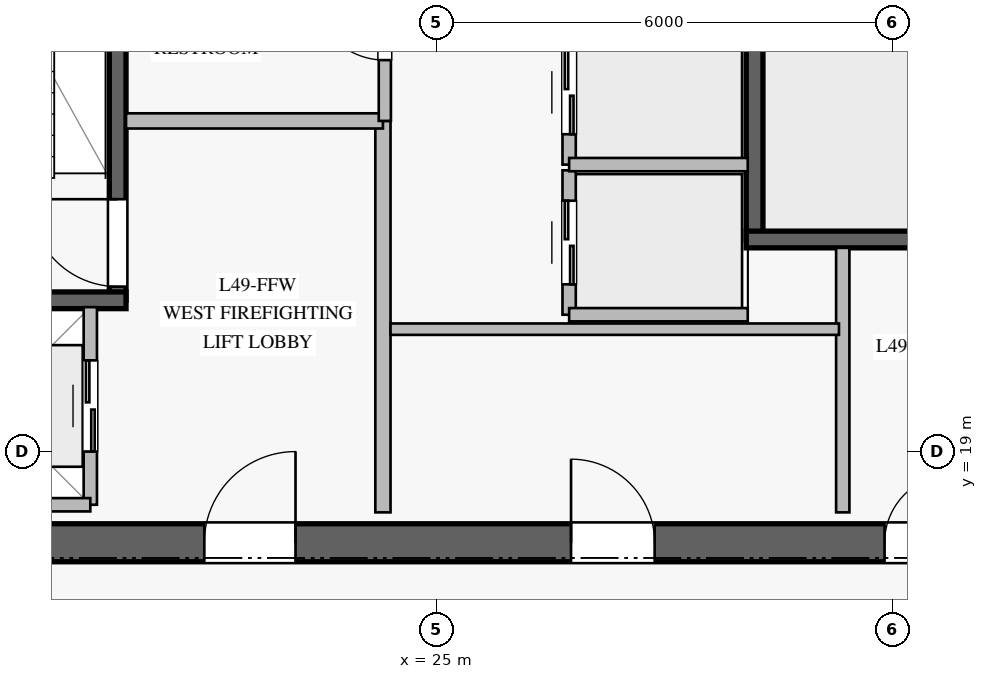
"""IFC4 building model, lengths in metres.
Left out: names, types, materials, properties, quantities, classifications, styles, units other than length and angle.
Written with IfcOpenShell. Run it as: python <this file> out.ifc"""

import sys

from ifc_helpers import new_model, si_unit, direction, frame, frame_2d, origin, place, context, subcontext, project, spatial, rectangle, extrude, element, fill, save


model = new_model("IFC4")
c1 = context("Model", 3, precision=1e-05, world=origin(), true_north=direction((0.0, 1.0)))
c2 = subcontext(c1, "Body", "Model", "MODEL_VIEW")
j1 = project(units=[si_unit("LENGTHUNIT", "METRE"), si_unit("PLANEANGLEUNIT", "RADIAN")], contexts=[c1])
p1 = place(None, origin())
s1 = spatial("IfcSite", under=j1, at=p1, CompositionType="ELEMENT")
p2 = place(p1, origin())
s2 = spatial("IfcBuilding", under=s1, at=p2, CompositionType="ELEMENT")
p3 = place(p2, frame((0.0, 0.0, 204.8)))
s3 = spatial("IfcBuildingStorey", under=s2, at=p3, CompositionType="ELEMENT", Elevation=204.8)
p4 = place(p3, frame((16.95, 17.8, 0.0), z_axis=(0.0, 0.0, 1.0), x_axis=(1.0, 0.0, 0.0)))
e1 = element("IfcWall", 1, at=p4, inside=s3, PredefinedType="SHEAR", context=c2, shape_type="SweptSolid", body=[
    extrude(rectangle(XDim=16.1, YDim=0.5, at=frame_2d((8.05, 0.0))), origin(), (0.0, 0.0, 1.0), 3.78),
])
p5 = place(p4, frame((5.0, 0.0, 0.0)))
e2 = element("IfcOpeningElement", 2, at=p5, cuts=e1, PredefinedType="OPENING", context=c2, shape_type="SweptSolid", body=[
    extrude(rectangle(XDim=1.2, YDim=2.25, at=frame_2d((0.6, 1.125))), frame((0.0, 0.26, 0.0), z_axis=(0.0, -1.0, 0.0), x_axis=(1.0, 0.0, 0.0)), (0.0, 0.0, 1.0), 0.52),
])
p6 = place(p4, frame((13.95, 0.0, 0.0)))
e3 = element("IfcOpeningElement", 3, at=p6, cuts=e1, PredefinedType="OPENING", context=c2, shape_type="SweptSolid", body=[
    extrude(rectangle(XDim=0.9, YDim=2.1, at=frame_2d((0.45, 1.05))), frame((0.0, 0.26, 0.0), z_axis=(0.0, -1.0, 0.0), x_axis=(1.0, 0.0, 0.0)), (0.0, 0.0, 1.0), 0.52),
])
p7 = place(p4, frame((9.825, 0.0, 0.0)))
e4 = element("IfcOpeningElement", 4, at=p7, cuts=e1, PredefinedType="OPENING", context=c2, shape_type="SweptSolid", body=[
    extrude(rectangle(XDim=1.1, YDim=2.2, at=frame_2d((0.55, 1.1))), frame((0.0, 0.26, 0.0), z_axis=(0.0, -1.0, 0.0), x_axis=(1.0, 0.0, 0.0)), (0.0, 0.0, 1.0), 0.52),
])
p8 = place(p3, frame((20.81, 20.99, 0.0), z_axis=(0.0, 0.0, 1.0), x_axis=(0.0, 1.0, 0.0)))
e5 = element("IfcWall", 5, at=p8, inside=s3, PredefinedType="SOLIDWALL", context=c2, shape_type="SweptSolid", body=[
    extrude(rectangle(XDim=7.22, YDim=0.22, at=frame_2d((3.61, 0.0))), origin(), (0.0, 0.0, 1.0), 3.78),
])
p9 = place(p8, frame((0.18, 0.0, 0.0)))
e6 = element("IfcOpeningElement", 6, at=p9, cuts=e5, PredefinedType="OPENING", context=c2, shape_type="SweptSolid", body=[
    extrude(rectangle(XDim=1.15, YDim=2.2, at=frame_2d((0.575, 1.1))), frame((0.0, 0.12, 0.0), z_axis=(0.0, -1.0, 0.0), x_axis=(1.0, 0.0, 0.0)), (0.0, 0.0, 1.0), 0.24),
])
p10 = place(p3, frame((17.2, 20.99, 0.0), z_axis=(0.0, 0.0, 1.0), x_axis=(1.0, 0.0, 0.0)))
e7 = element("IfcWall", 7, at=p10, inside=s3, PredefinedType="SOLIDWALL", context=c2, shape_type="SweptSolid", body=[
    extrude(rectangle(XDim=3.72, YDim=0.22, at=frame_2d((1.86, 0.0))), origin(), (0.0, 0.0, 1.0), 3.78),
])
p11 = place(p3, frame((29.19, 21.79, 0.0), z_axis=(0.0, 0.0, 1.0), x_axis=(0.0, 1.0, 0.0)))
e8 = element("IfcWall", 8, at=p11, inside=s3, PredefinedType="SOLIDWALL", context=c2, shape_type="SweptSolid", body=[
    extrude(rectangle(XDim=7.22, YDim=0.22, at=frame_2d((3.61, 0.0))), origin(), (0.0, 0.0, 1.0), 3.78),
])
p12 = place(p11, frame((5.88, 0.0, 0.0)))
e9 = element("IfcOpeningElement", 9, at=p12, cuts=e8, PredefinedType="OPENING", context=c2, shape_type="SweptSolid", body=[
    extrude(rectangle(XDim=1.15, YDim=2.2, at=frame_2d((0.575, 1.1))), frame((0.0, 0.12, 0.0), z_axis=(0.0, -1.0, 0.0), x_axis=(1.0, 0.0, 0.0)), (0.0, 0.0, 1.0), 0.24),
])
p13 = place(p3, frame((29.08, 21.79, 0.0), z_axis=(0.0, 0.0, 1.0), x_axis=(1.0, 0.0, 0.0)))
e10 = element("IfcWall", 10, at=p13, inside=s3, PredefinedType="SOLIDWALL", context=c2, shape_type="SweptSolid", body=[
    extrude(rectangle(XDim=3.72, YDim=0.22, at=frame_2d((1.86, 0.0))), origin(), (0.0, 0.0, 1.0), 3.78),
])
p14 = place(p3, frame((24.3, 18.2, 0.0), z_axis=(0.0, 0.0, 1.0), x_axis=(0.0, 1.0, 0.0)))
e11 = element("IfcWall", 11, at=p14, inside=s3, PredefinedType="PARTITIONING", context=c2, shape_type="SweptSolid", body=[
    extrude(rectangle(XDim=5.15, YDim=0.2, at=frame_2d((2.575, 0.0))), origin(), (0.0, 0.0, 1.0), 3.78),
])
p15 = place(p3, frame((20.92, 23.35, 0.0), z_axis=(0.0, 0.0, 1.0), x_axis=(1.0, 0.0, 0.0)))
e12 = element("IfcWall", 12, at=p15, inside=s3, PredefinedType="PARTITIONING", context=c2, shape_type="SweptSolid", body=[
    extrude(rectangle(XDim=3.38, YDim=0.2, at=frame_2d((1.69, 0.0))), origin(), (0.0, 0.0, 1.0), 3.78),
])
p16 = place(p3, frame((24.325, 23.35, 0.0), z_axis=(0.0, 0.0, 1.0), x_axis=(0.0, 1.0, 0.0)))
e13 = element("IfcWall", 13, at=p16, inside=s3, PredefinedType="PLUMBINGWALL", context=c2, shape_type="SweptSolid", body=[
    extrude(rectangle(XDim=4.93, YDim=0.16, at=frame_2d((2.465, 0.0))), origin(), (0.0, 0.0, 1.0), 3.78),
])
p17 = place(p16, frame((0.8, 0.0, 0.0)))
e14 = element("IfcOpeningElement", 14, at=p17, cuts=e13, PredefinedType="OPENING", context=c2, shape_type="SweptSolid", body=[
    extrude(rectangle(XDim=0.95, YDim=2.1, at=frame_2d((0.475, 1.05))), frame((0.0, 0.09, 0.0), z_axis=(0.0, -1.0, 0.0), x_axis=(1.0, 0.0, 0.0)), (0.0, 0.0, 1.0), 0.18),
])
p18 = place(p16, frame((3.26, 0.0, 0.0)))
e15 = element("IfcOpeningElement", 15, at=p18, cuts=e13, PredefinedType="OPENING", context=c2, shape_type="SweptSolid", body=[
    extrude(rectangle(XDim=0.9, YDim=2.1, at=frame_2d((0.45, 1.05))), frame((0.0, 0.09, 0.0), z_axis=(0.0, -1.0, 0.0), x_axis=(1.0, 0.0, 0.0)), (0.0, 0.0, 1.0), 0.18),
])
p19 = place(p3, frame((30.35, 18.2, 0.0), z_axis=(0.0, 0.0, 1.0), x_axis=(0.0, 1.0, 0.0)))
e16 = element("IfcWall", 16, at=p19, inside=s3, PredefinedType="PARTITIONING", context=c2, shape_type="SweptSolid", body=[
    extrude(rectangle(XDim=3.48, YDim=0.175, at=frame_2d((1.74, 0.0))), origin(), (0.0, 0.0, 1.0), 3.78),
])
p20 = place(p3, frame((24.4, 20.61, 0.0), z_axis=(0.0, 0.0, 1.0), x_axis=(1.0, 0.0, 0.0)))
e17 = element("IfcWall", 17, at=p20, inside=s3, PredefinedType="PARTITIONING", context=c2, shape_type="SweptSolid", body=[
    extrude(rectangle(XDim=5.9, YDim=0.15, at=frame_2d((2.95, 0.0))), origin(), (0.0, 0.0, 1.0), 3.78),
])
p21 = place(p3, frame((26.75, 20.8, 0.0), z_axis=(0.0, 0.0, 1.0), x_axis=(0.0, 1.0, 0.0)))
e18 = element("IfcWall", 18, at=p21, inside=s3, PredefinedType="PARTITIONING", context=c2, shape_type="SweptSolid", body=[
    extrude(rectangle(XDim=1.9, YDim=0.175, at=frame_2d((0.95, 0.0))), origin(), (0.0, 0.0, 1.0), 3.78),
])
p22 = place(p21, frame((0.4, 0.0, 0.0)))
e19 = element("IfcOpeningElement", 19, at=p22, cuts=e18, PredefinedType="OPENING", context=c2, shape_type="SweptSolid", body=[
    extrude(rectangle(XDim=1.1, YDim=2.2, at=frame_2d((0.55, 1.1))), frame((0.0, 0.098, 0.0), z_axis=(0.0, -1.0, 0.0), x_axis=(1.0, 0.0, 0.0)), (0.0, 0.0, 1.0), 0.195),
])
p23 = place(p3, frame((26.75, 20.8, 0.0), z_axis=(0.0, 0.0, 1.0), x_axis=(1.0, 0.0, 0.0)))
e20 = element("IfcWall", 20, at=p23, inside=s3, PredefinedType="PARTITIONING", context=c2, shape_type="SweptSolid", body=[
    extrude(rectangle(XDim=2.35, YDim=0.175, at=frame_2d((1.175, 0.0))), origin(), (0.0, 0.0, 1.0), 3.78),
])
p24 = place(p3, frame((26.75, 22.775, 0.0), z_axis=(0.0, 0.0, 1.0), x_axis=(0.0, 1.0, 0.0)))
e21 = element("IfcWall", 21, at=p24, inside=s3, PredefinedType="PARTITIONING", context=c2, shape_type="SweptSolid", body=[
    extrude(rectangle(XDim=1.9, YDim=0.175, at=frame_2d((0.95, 0.0))), origin(), (0.0, 0.0, 1.0), 3.78),
])
p25 = place(p24, frame((0.4, 0.0, 0.0)))
e22 = element("IfcOpeningElement", 22, at=p25, cuts=e21, PredefinedType="OPENING", context=c2, shape_type="SweptSolid", body=[
    extrude(rectangle(XDim=1.1, YDim=2.2, at=frame_2d((0.55, 1.1))), frame((0.0, 0.098, 0.0), z_axis=(0.0, -1.0, 0.0), x_axis=(1.0, 0.0, 0.0)), (0.0, 0.0, 1.0), 0.195),
])
p26 = place(p3, frame((26.75, 22.775, 0.0), z_axis=(0.0, 0.0, 1.0), x_axis=(1.0, 0.0, 0.0)))
e23 = element("IfcWall", 23, at=p26, inside=s3, PredefinedType="PARTITIONING", context=c2, shape_type="SweptSolid", body=[
    extrude(rectangle(XDim=2.35, YDim=0.175, at=frame_2d((1.175, 0.0))), origin(), (0.0, 0.0, 1.0), 3.78),
])
p27 = place(p3, frame((20.45, 18.3, 0.0), z_axis=(0.0, 0.0, 1.0), x_axis=(0.0, 1.0, 0.0)))
e24 = element("IfcWall", 24, at=p27, inside=s3, PredefinedType="PARTITIONING", context=c2, shape_type="SweptSolid", body=[
    extrude(rectangle(XDim=2.6, YDim=0.175, at=frame_2d((1.3, 0.0))), origin(), (0.0, 0.0, 1.0), 3.78),
])
p28 = place(p27, frame((0.7, 0.0, 0.0)))
e25 = element("IfcOpeningElement", 25, at=p28, cuts=e24, PredefinedType="OPENING", context=c2, shape_type="SweptSolid", body=[
    extrude(rectangle(XDim=1.2, YDim=2.2, at=frame_2d((0.6, 1.1))), frame((0.0, 0.098, 0.0), z_axis=(0.0, -1.0, 0.0), x_axis=(1.0, 0.0, 0.0)), (0.0, 0.0, 1.0), 0.195),
])
p29 = place(p3, frame((17.85, 18.3, 0.0), z_axis=(0.0, 0.0, 1.0), x_axis=(1.0, 0.0, 0.0)))
e26 = element("IfcWall", 26, at=p29, inside=s3, PredefinedType="PARTITIONING", context=c2, shape_type="SweptSolid", body=[
    extrude(rectangle(XDim=2.6, YDim=0.175, at=frame_2d((1.3, 0.0))), origin(), (0.0, 0.0, 1.0), 3.78),
])
p30 = place(p9, origin())
e27 = element("IfcDoor", 27, at=p30, inside=s3, OperationType="SINGLE_SWING_RIGHT", PredefinedType="DOOR", context=c2, shape_type="SweptSolid", body=[
    extrude(rectangle(XDim=1.15, YDim=2.2, at=frame_2d((0.575, 1.1))), frame((0.0, 0.025, 0.0), z_axis=(0.0, -1.0, 0.0), x_axis=(1.0, 0.0, 0.0)), (0.0, 0.0, 1.0), 0.05),
])
fill(e6, e27)
p31 = place(p5, origin())
e28 = element("IfcDoor", 28, at=p31, inside=s3, OperationType="SINGLE_SWING_RIGHT", PredefinedType="DOOR", context=c2, shape_type="SweptSolid", body=[
    extrude(rectangle(XDim=1.2, YDim=2.25, at=frame_2d((0.6, 1.125))), frame((0.0, 0.025, 0.0), z_axis=(0.0, -1.0, 0.0), x_axis=(1.0, 0.0, 0.0)), (0.0, 0.0, 1.0), 0.05),
])
fill(e2, e28)
p32 = place(p17, origin())
e29 = element("IfcDoor", 29, at=p32, inside=s3, OperationType="SINGLE_SWING_RIGHT", PredefinedType="DOOR", context=c2, shape_type="SweptSolid", body=[
    extrude(rectangle(XDim=0.95, YDim=2.1, at=frame_2d((0.475, 1.05))), frame((0.0, 0.025, 0.0), z_axis=(0.0, -1.0, 0.0), x_axis=(1.0, 0.0, 0.0)), (0.0, 0.0, 1.0), 0.05),
])
fill(e14, e29)
p33 = place(p6, origin())
e30 = element("IfcDoor", 30, at=p33, inside=s3, OperationType="SINGLE_SWING_RIGHT", PredefinedType="DOOR", context=c2, shape_type="SweptSolid", body=[
    extrude(rectangle(XDim=0.9, YDim=2.1, at=frame_2d((0.45, 1.05))), frame((0.0, 0.025, 0.0), z_axis=(0.0, -1.0, 0.0), x_axis=(1.0, 0.0, 0.0)), (0.0, 0.0, 1.0), 0.05),
])
fill(e3, e30)
p34 = place(p7, origin())
e31 = element("IfcDoor", 31, at=p34, inside=s3, OperationType="SINGLE_SWING_LEFT", PredefinedType="DOOR", context=c2, shape_type="SweptSolid", body=[
    extrude(rectangle(XDim=1.1, YDim=2.2, at=frame_2d((0.55, 1.1))), frame((0.0, 0.025, 0.0), z_axis=(0.0, -1.0, 0.0), x_axis=(1.0, 0.0, 0.0)), (0.0, 0.0, 1.0), 0.05),
])
fill(e4, e31)
p35 = place(p22, origin())
e32 = element("IfcDoor", 32, at=p35, inside=s3, OperationType="DOUBLE_DOOR_SLIDING", PredefinedType="DOOR", context=c2, shape_type="SweptSolid", body=[
    extrude(rectangle(XDim=1.1, YDim=2.2, at=frame_2d((0.55, 1.1))), frame((0.0, 0.025, 0.0), z_axis=(0.0, -1.0, 0.0), x_axis=(1.0, 0.0, 0.0)), (0.0, 0.0, 1.0), 0.05),
])
fill(e19, e32)
p36 = place(p25, origin())
e33 = element("IfcDoor", 33, at=p36, inside=s3, OperationType="DOUBLE_DOOR_SLIDING", PredefinedType="DOOR", context=c2, shape_type="SweptSolid", body=[
    extrude(rectangle(XDim=1.1, YDim=2.2, at=frame_2d((0.55, 1.1))), frame((0.0, 0.025, 0.0), z_axis=(0.0, -1.0, 0.0), x_axis=(1.0, 0.0, 0.0)), (0.0, 0.0, 1.0), 0.05),
])
fill(e22, e33)
p37 = place(p28, origin())
e34 = element("IfcDoor", 34, at=p37, inside=s3, OperationType="DOUBLE_DOOR_SLIDING", PredefinedType="DOOR", context=c2, shape_type="SweptSolid", body=[
    extrude(rectangle(XDim=1.2, YDim=2.2, at=frame_2d((0.6, 1.1))), frame((0.0, 0.025, 0.0), z_axis=(0.0, -1.0, 0.0), x_axis=(1.0, 0.0, 0.0)), (0.0, 0.0, 1.0), 0.05),
])
fill(e25, e34)
save(model, sys.argv[1])
